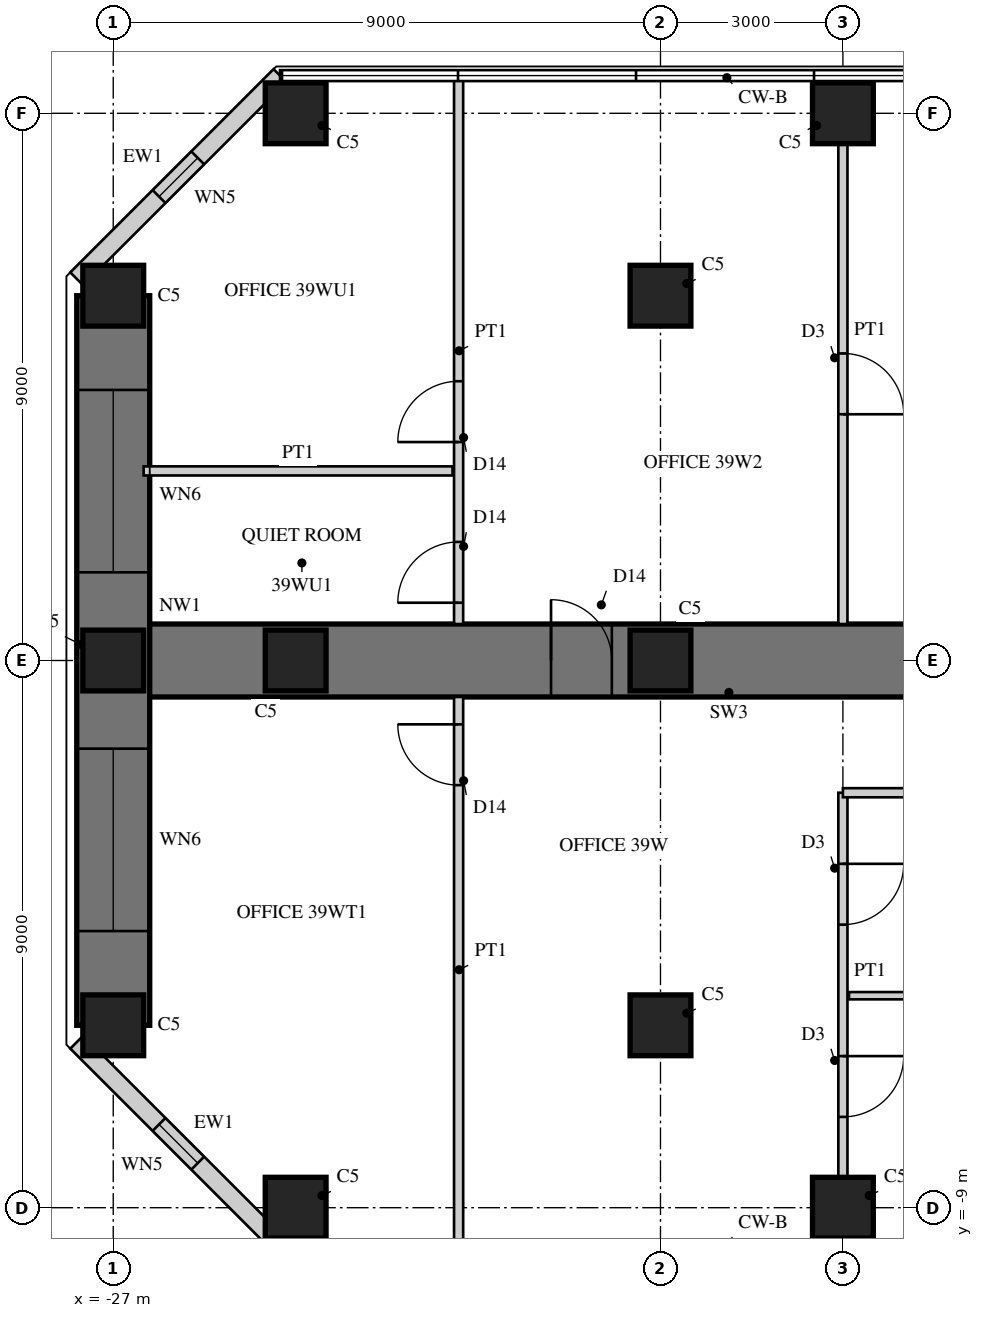
"""IFC4 building model, lengths in metres.
Left out: names, types, materials, properties, quantities, classifications, styles, units other than length and angle.
Written with IfcOpenShell. Run it as: python <this file> out.ifc"""

import sys

from ifc_helpers import new_model, si_unit, direction, frame, frame_2d, origin, origin_2d, place, context, subcontext, project, spatial, rectangle, hollow_rectangle, extrude, element, fill, save


model = new_model("IFC4")
c1 = context("Model", 3, precision=1e-05, world=origin(), true_north=direction((0.0, 1.0)))
c2 = subcontext(c1, "Body", "Model", "MODEL_VIEW")
j1 = project(units=[si_unit("LENGTHUNIT", "METRE"), si_unit("PLANEANGLEUNIT", "RADIAN")], contexts=[c1])
p1 = place(None, origin())
s1 = spatial("IfcSite", under=j1, at=p1, CompositionType="ELEMENT")
p2 = place(p1, origin())
s2 = spatial("IfcBuilding", under=s1, at=p2, CompositionType="ELEMENT")
p3 = place(p2, frame((0.0, 0.0, 160.5)))
s3 = spatial("IfcBuildingStorey", under=s2, at=p3, CompositionType="ELEMENT", Elevation=160.5)
p4 = place(p3, frame((-9.0, 0.0, 0.0), z_axis=(0.0, 0.0, 1.0), x_axis=(-1.0, 0.0, 0.0)))
e1 = element("IfcWall", 1, at=p4, inside=s3, PredefinedType="SHEAR", context=c2, shape_type="SweptSolid", body=[
    extrude(rectangle(XDim=18.0, YDim=1.2, at=frame_2d((9.0, 0.0))), origin(), (0.0, 0.0, 1.0), 4.0),
])
p5 = place(p4, frame((9.8, 0.0, 0.0)))
e2 = element("IfcOpeningElement", 2, at=p5, cuts=e1, PredefinedType="OPENING", context=c2, shape_type="SweptSolid", body=[
    extrude(rectangle(XDim=1.0, YDim=2.2, at=frame_2d((0.5, 1.1))), frame((0.0, 0.61, 0.0), z_axis=(0.0, -1.0, 0.0), x_axis=(1.0, 0.0, 0.0)), (0.0, 0.0, 1.0), 1.22),
])
p6 = place(p3, frame((-27.0, 6.0, 0.0), z_axis=(0.0, 0.0, 1.0), x_axis=(0.0, -1.0, 0.0)))
e3 = element("IfcWall", 3, at=p6, inside=s3, PredefinedType="SHEAR", context=c2, shape_type="SweptSolid", body=[
    extrude(rectangle(XDim=12.0, YDim=1.2, at=frame_2d((6.0, 0.0))), origin(), (0.0, 0.0, 1.0), 4.0),
])
p7 = place(p6, frame((1.55, 0.0, 0.6)))
e4 = element("IfcOpeningElement", 4, at=p7, cuts=e3, PredefinedType="OPENING", context=c2, shape_type="SweptSolid", body=[
    extrude(rectangle(XDim=3.0, YDim=2.4, at=frame_2d((1.5, 1.2))), frame((0.0, 0.61, 0.0), z_axis=(0.0, -1.0, 0.0), x_axis=(1.0, 0.0, 0.0)), (0.0, 0.0, 1.0), 1.22),
])
p8 = place(p6, frame((7.45, 0.0, 0.6)))
e5 = element("IfcOpeningElement", 5, at=p8, cuts=e3, PredefinedType="OPENING", context=c2, shape_type="SweptSolid", body=[
    extrude(rectangle(XDim=3.0, YDim=2.4, at=frame_2d((1.5, 1.2))), frame((0.0, 0.61, 0.0), z_axis=(0.0, -1.0, 0.0), x_axis=(1.0, 0.0, 0.0)), (0.0, 0.0, 1.0), 1.22),
])
for number, where, z_axis, x_axis in (
    (6, (-15.0, 9.0, 0.0), (0.0, 0.0, 1.0), (1.0, 0.0, 0.0)),
    (7, (-24.0, 9.0, 0.0), (0.0, 0.0, 1.0), (1.0, 0.0, 0.0)),
    (8, (-15.0, -9.0, 0.0), (0.0, 0.0, 1.0), (1.0, 0.0, 0.0)),
    (9, (-24.0, -9.0, 0.0), (0.0, 0.0, 1.0), (1.0, 0.0, 0.0)),
    (10, (-27.0, 6.0, 0.0), (0.0, 0.0, 1.0), (1.0, 0.0, 0.0)),
    (11, (-27.0, 0.0, 0.0), (0.0, 0.0, 1.0), (1.0, 0.0, 0.0)),
    (12, (-27.0, -6.0, 0.0), (0.0, 0.0, 1.0), (1.0, 0.0, 0.0)),
    (13, (-18.0, 6.0, 0.0), (0.0, 0.0, 1.0), (1.0, 0.0, 0.0)),
    (14, (-18.0, 0.0, 0.0), (0.0, 0.0, 1.0), (1.0, 0.0, 0.0)),
    (15, (-18.0, -6.0, 0.0), (0.0, 0.0, 1.0), (1.0, 0.0, 0.0)),
    (16, (-24.0, 0.0, 0.0), (0.0, 0.0, 1.0), (1.0, 0.0, 0.0)),
):
    element("IfcColumn", number, at=place(p3, frame(where, z_axis=z_axis, x_axis=x_axis)), inside=s3, PredefinedType="COLUMN", context=c2, shape_type="SweptSolid", body=[
        extrude(rectangle(XDim=1.0, YDim=1.0, at=origin_2d()), origin(), (0.0, 0.0, 1.0), 4.0),
    ])
p9 = place(p3, frame((-24.257, 9.62, 0.0), z_axis=(0.0, 0.0, 1.0), x_axis=(-0.707106781187, -0.707106781187, 0.0)))
e17 = element("IfcWall", 17, at=p9, inside=s3, PredefinedType="SOLIDWALL", context=c2, shape_type="SweptSolid", body=[
    extrude(rectangle(XDim=4.728, YDim=0.3, at=frame_2d((2.364, 0.0))), origin(), (0.0, 0.0, 1.0), 3.75),
])
p10 = place(p9, frame((1.914, 0.0, 0.3)))
e18 = element("IfcOpeningElement", 18, at=p10, cuts=e17, PredefinedType="OPENING", context=c2, shape_type="SweptSolid", body=[
    extrude(rectangle(XDim=0.9, YDim=2.4, at=frame_2d((0.45, 1.2))), frame((0.0, 0.16, 0.0), z_axis=(0.0, -1.0, 0.0), x_axis=(1.0, 0.0, 0.0)), (0.0, 0.0, 1.0), 0.32),
])
p11 = place(p3, frame((-27.6, -6.277, 0.0), z_axis=(0.0, 0.0, 1.0), x_axis=(0.707106781187, -0.707106781187, 0.0)))
e19 = element("IfcWall", 19, at=p11, inside=s3, PredefinedType="SOLIDWALL", context=c2, shape_type="SweptSolid", body=[
    extrude(rectangle(XDim=4.728, YDim=0.3, at=frame_2d((2.364, 0.0))), origin(), (0.0, 0.0, 1.0), 3.75),
])
p12 = place(p11, frame((1.914, 0.0, 0.3)))
e20 = element("IfcOpeningElement", 20, at=p12, cuts=e19, PredefinedType="OPENING", context=c2, shape_type="SweptSolid", body=[
    extrude(rectangle(XDim=0.9, YDim=2.4, at=frame_2d((0.45, 1.2))), frame((0.0, 0.16, 0.0), z_axis=(0.0, -1.0, 0.0), x_axis=(1.0, 0.0, 0.0)), (0.0, 0.0, 1.0), 0.32),
])
p13 = place(p3, frame((-15.0, -2.175, 0.0), z_axis=(0.0, 0.0, 1.0), x_axis=(0.0, -1.0, 0.0)))
e21 = element("IfcWall", 21, at=p13, inside=s3, PredefinedType="PARTITIONING", context=c2, shape_type="SweptSolid", body=[
    extrude(rectangle(XDim=6.325, YDim=0.15, at=frame_2d((3.163, 0.0))), origin(), (0.0, 0.0, 1.0), 2.7),
])
p14 = place(p13, frame((1.169, 0.0, 0.0)))
e22 = element("IfcOpeningElement", 22, at=p14, cuts=e21, PredefinedType="OPENING", context=c2, shape_type="SweptSolid", body=[
    extrude(rectangle(XDim=1.0, YDim=2.1, at=frame_2d((0.5, 1.05))), frame((0.0, 0.085, 0.0), z_axis=(0.0, -1.0, 0.0), x_axis=(1.0, 0.0, 0.0)), (0.0, 0.0, 1.0), 0.17),
])
p15 = place(p13, frame((4.332, 0.0, 0.0)))
e23 = element("IfcOpeningElement", 23, at=p15, cuts=e21, PredefinedType="OPENING", context=c2, shape_type="SweptSolid", body=[
    extrude(rectangle(XDim=1.0, YDim=2.1, at=frame_2d((0.5, 1.05))), frame((0.0, 0.085, 0.0), z_axis=(0.0, -1.0, 0.0), x_axis=(1.0, 0.0, 0.0)), (0.0, 0.0, 1.0), 0.17),
])
p16 = place(p3, frame((-9.65, -2.175, 0.0), z_axis=(0.0, 0.0, 1.0), x_axis=(-1.0, 0.0, 0.0)))
e24 = element("IfcWall", 24, at=p16, inside=s3, PredefinedType="PARTITIONING", context=c2, shape_type="SweptSolid", body=[
    extrude(rectangle(XDim=5.35, YDim=0.15, at=frame_2d((2.675, 0.0))), origin(), (0.0, 0.0, 1.0), 3.75),
])
p17 = place(p3, frame((-9.65, -5.513, 0.0), z_axis=(0.0, 0.0, 1.0), x_axis=(-1.0, 0.0, 0.0)))
e25 = element("IfcWall", 25, at=p17, inside=s3, PredefinedType="PLUMBINGWALL", context=c2, shape_type="SweptSolid", body=[
    extrude(rectangle(XDim=5.25, YDim=0.12, at=frame_2d((2.625, 0.0))), origin(), (0.0, 0.0, 1.0), 3.75),
])
p18 = place(p3, frame((-15.0, 8.5, 0.0), z_axis=(0.0, 0.0, 1.0), x_axis=(0.0, -1.0, 0.0)))
e26 = element("IfcWall", 26, at=p18, inside=s3, PredefinedType="PARTITIONING", context=c2, shape_type="SweptSolid", body=[
    extrude(rectangle(XDim=7.9, YDim=0.15, at=frame_2d((3.95, 0.0))), origin(), (0.0, 0.0, 1.0), 2.7),
])
p19 = place(p18, frame((3.45, 0.0, 0.0)))
e27 = element("IfcOpeningElement", 27, at=p19, cuts=e26, PredefinedType="OPENING", context=c2, shape_type="SweptSolid", body=[
    extrude(rectangle(XDim=1.0, YDim=2.1, at=frame_2d((0.5, 1.05))), frame((0.0, 0.085, 0.0), z_axis=(0.0, -1.0, 0.0), x_axis=(1.0, 0.0, 0.0)), (0.0, 0.0, 1.0), 0.17),
])
p20 = place(p3, frame((-21.32, -0.6, 0.0), z_axis=(0.0, 0.0, 1.0), x_axis=(0.0, -1.0, 0.0)))
e28 = element("IfcWall", 28, at=p20, inside=s3, PredefinedType="PARTITIONING", context=c2, shape_type="SweptSolid", body=[
    extrude(rectangle(XDim=8.98, YDim=0.15, at=frame_2d((4.49, 0.0))), origin(), (0.0, 0.0, 1.0), 3.75),
])
p21 = place(p20, frame((0.45, 0.0, 0.0)))
e29 = element("IfcOpeningElement", 29, at=p21, cuts=e28, PredefinedType="OPENING", context=c2, shape_type="SweptSolid", body=[
    extrude(rectangle(XDim=1.0, YDim=2.2, at=frame_2d((0.5, 1.1))), frame((0.0, 0.085, 0.0), z_axis=(0.0, -1.0, 0.0), x_axis=(1.0, 0.0, 0.0)), (0.0, 0.0, 1.0), 0.17),
])
p22 = place(p3, frame((-21.42, 3.118, 0.0), z_axis=(0.0, 0.0, 1.0), x_axis=(-1.0, 0.0, 0.0)))
e30 = element("IfcWall", 30, at=p22, inside=s3, PredefinedType="PARTITIONING", context=c2, shape_type="SweptSolid", body=[
    extrude(rectangle(XDim=5.08, YDim=0.15, at=frame_2d((2.54, 0.0))), origin(), (0.0, 0.0, 1.0), 3.75),
])
p23 = place(p3, frame((-21.32, 9.58, 0.0), z_axis=(0.0, 0.0, 1.0), x_axis=(0.0, -1.0, 0.0)))
e31 = element("IfcWall", 31, at=p23, inside=s3, PredefinedType="PARTITIONING", context=c2, shape_type="SweptSolid", body=[
    extrude(rectangle(XDim=8.98, YDim=0.15, at=frame_2d((4.49, 0.0))), origin(), (0.0, 0.0, 1.0), 3.75),
])
p24 = place(p23, frame((4.987, 0.0, 0.0)))
e32 = element("IfcOpeningElement", 32, at=p24, cuts=e31, PredefinedType="OPENING", context=c2, shape_type="SweptSolid", body=[
    extrude(rectangle(XDim=1.0, YDim=2.2, at=frame_2d((0.5, 1.1))), frame((0.0, 0.085, 0.0), z_axis=(0.0, -1.0, 0.0), x_axis=(1.0, 0.0, 0.0)), (0.0, 0.0, 1.0), 0.17),
])
p25 = place(p23, frame((7.63, 0.0, 0.0)))
e33 = element("IfcOpeningElement", 33, at=p25, cuts=e31, PredefinedType="OPENING", context=c2, shape_type="SweptSolid", body=[
    extrude(rectangle(XDim=1.0, YDim=2.2, at=frame_2d((0.5, 1.1))), frame((0.0, 0.085, 0.0), z_axis=(0.0, -1.0, 0.0), x_axis=(1.0, 0.0, 0.0)), (0.0, 0.0, 1.0), 0.17),
])
p26 = place(p10, origin())
e34 = element("IfcWindow", 34, at=p26, inside=s3, PartitioningType="SINGLE_PANEL", PredefinedType="WINDOW", context=c2, shape_type="SweptSolid", body=[
    extrude(hollow_rectangle(XDim=0.9, YDim=2.4, WallThickness=0.06, at=frame_2d((0.45, 1.2))), frame((0.0, 0.03, 0.0), z_axis=(0.0, -1.0, 0.0), x_axis=(1.0, 0.0, 0.0)), (0.0, 0.0, 1.0), 0.06),
    extrude(rectangle(XDim=0.779, YDim=2.279, at=frame_2d((0.45, 1.2))), frame((0.0, 0.03, 0.0), z_axis=(0.0, -1.0, 0.0), x_axis=(1.0, 0.0, 0.0)), (0.0, 0.0, 1.0), 0.06),
])
fill(e18, e34)
p27 = place(p7, origin())
e35 = element("IfcWindow", 35, at=p27, inside=s3, PartitioningType="SINGLE_PANEL", PredefinedType="WINDOW", context=c2, shape_type="SweptSolid", body=[
    extrude(hollow_rectangle(XDim=3.0, YDim=2.4, WallThickness=0.06, at=frame_2d((1.5, 1.2))), frame((0.0, 0.03, 0.0), z_axis=(0.0, -1.0, 0.0), x_axis=(1.0, 0.0, 0.0)), (0.0, 0.0, 1.0), 0.06),
    extrude(rectangle(XDim=2.879, YDim=2.279, at=frame_2d((1.5, 1.2))), frame((0.0, 0.03, 0.0), z_axis=(0.0, -1.0, 0.0), x_axis=(1.0, 0.0, 0.0)), (0.0, 0.0, 1.0), 0.06),
])
fill(e4, e35)
p28 = place(p8, origin())
e36 = element("IfcWindow", 36, at=p28, inside=s3, PartitioningType="SINGLE_PANEL", PredefinedType="WINDOW", context=c2, shape_type="SweptSolid", body=[
    extrude(hollow_rectangle(XDim=3.0, YDim=2.4, WallThickness=0.06, at=frame_2d((1.5, 1.2))), frame((0.0, 0.03, 0.0), z_axis=(0.0, -1.0, 0.0), x_axis=(1.0, 0.0, 0.0)), (0.0, 0.0, 1.0), 0.06),
    extrude(rectangle(XDim=2.879, YDim=2.279, at=frame_2d((1.5, 1.2))), frame((0.0, 0.03, 0.0), z_axis=(0.0, -1.0, 0.0), x_axis=(1.0, 0.0, 0.0)), (0.0, 0.0, 1.0), 0.06),
])
fill(e5, e36)
p29 = place(p12, origin())
e37 = element("IfcWindow", 37, at=p29, inside=s3, PartitioningType="SINGLE_PANEL", PredefinedType="WINDOW", context=c2, shape_type="SweptSolid", body=[
    extrude(hollow_rectangle(XDim=0.9, YDim=2.4, WallThickness=0.06, at=frame_2d((0.45, 1.2))), frame((0.0, 0.03, 0.0), z_axis=(0.0, -1.0, 0.0), x_axis=(1.0, 0.0, 0.0)), (0.0, 0.0, 1.0), 0.06),
    extrude(rectangle(XDim=0.779, YDim=2.279, at=frame_2d((0.45, 1.2))), frame((0.0, 0.03, 0.0), z_axis=(0.0, -1.0, 0.0), x_axis=(1.0, 0.0, 0.0)), (0.0, 0.0, 1.0), 0.06),
])
fill(e20, e37)
p30 = place(p14, origin())
e38 = element("IfcDoor", 38, at=p30, inside=s3, OperationType="SINGLE_SWING_LEFT", PredefinedType="DOOR", context=c2, shape_type="SweptSolid", body=[
    extrude(rectangle(XDim=1.0, YDim=2.1, at=frame_2d((0.5, 1.05))), frame((0.0, 0.025, 0.0), z_axis=(0.0, -1.0, 0.0), x_axis=(1.0, 0.0, 0.0)), (0.0, 0.0, 1.0), 0.05),
])
fill(e22, e38)
p31 = place(p15, origin())
e39 = element("IfcDoor", 39, at=p31, inside=s3, OperationType="SINGLE_SWING_LEFT", PredefinedType="DOOR", context=c2, shape_type="SweptSolid", body=[
    extrude(rectangle(XDim=1.0, YDim=2.1, at=frame_2d((0.5, 1.05))), frame((0.0, 0.025, 0.0), z_axis=(0.0, -1.0, 0.0), x_axis=(1.0, 0.0, 0.0)), (0.0, 0.0, 1.0), 0.05),
])
fill(e23, e39)
p32 = place(p19, origin())
e40 = element("IfcDoor", 40, at=p32, inside=s3, OperationType="SINGLE_SWING_RIGHT", PredefinedType="DOOR", context=c2, shape_type="SweptSolid", body=[
    extrude(rectangle(XDim=1.0, YDim=2.1, at=frame_2d((0.5, 1.05))), frame((0.0, 0.025, 0.0), z_axis=(0.0, -1.0, 0.0), x_axis=(1.0, 0.0, 0.0)), (0.0, 0.0, 1.0), 0.05),
])
fill(e27, e40)
p33 = place(p21, frame((1.0, 0.0, 0.0), z_axis=(0.0, 0.0, 1.0), x_axis=(-1.0, 0.0, 0.0)))
e41 = element("IfcDoor", 41, at=p33, inside=s3, OperationType="SINGLE_SWING_RIGHT", PredefinedType="DOOR", context=c2, shape_type="SweptSolid", body=[
    extrude(rectangle(XDim=1.0, YDim=2.2, at=frame_2d((0.5, 1.1))), frame((0.0, 0.025, 0.0), z_axis=(0.0, -1.0, 0.0), x_axis=(1.0, 0.0, 0.0)), (0.0, 0.0, 1.0), 0.05),
])
fill(e29, e41)
p34 = place(p24, frame((1.0, 0.0, 0.0), z_axis=(0.0, 0.0, 1.0), x_axis=(-1.0, 0.0, 0.0)))
e42 = element("IfcDoor", 42, at=p34, inside=s3, OperationType="SINGLE_SWING_LEFT", PredefinedType="DOOR", context=c2, shape_type="SweptSolid", body=[
    extrude(rectangle(XDim=1.0, YDim=2.2, at=frame_2d((0.5, 1.1))), frame((0.0, 0.025, 0.0), z_axis=(0.0, -1.0, 0.0), x_axis=(1.0, 0.0, 0.0)), (0.0, 0.0, 1.0), 0.05),
])
fill(e32, e42)
p35 = place(p25, frame((1.0, 0.0, 0.0), z_axis=(0.0, 0.0, 1.0), x_axis=(-1.0, 0.0, 0.0)))
e43 = element("IfcDoor", 43, at=p35, inside=s3, OperationType="SINGLE_SWING_LEFT", PredefinedType="DOOR", context=c2, shape_type="SweptSolid", body=[
    extrude(rectangle(XDim=1.0, YDim=2.2, at=frame_2d((0.5, 1.1))), frame((0.0, 0.025, 0.0), z_axis=(0.0, -1.0, 0.0), x_axis=(1.0, 0.0, 0.0)), (0.0, 0.0, 1.0), 0.05),
])
fill(e33, e43)
p36 = place(p5, frame((1.0, 0.0, 0.0), z_axis=(0.0, 0.0, 1.0), x_axis=(-1.0, 0.0, 0.0)))
e44 = element("IfcDoor", 44, at=p36, inside=s3, OperationType="SINGLE_SWING_LEFT", PredefinedType="DOOR", context=c2, shape_type="SweptSolid", body=[
    extrude(rectangle(XDim=1.0, YDim=2.2, at=frame_2d((0.5, 1.1))), frame((0.0, 0.025, 0.0), z_axis=(0.0, -1.0, 0.0), x_axis=(1.0, 0.0, 0.0)), (0.0, 0.0, 1.0), 0.05),
])
fill(e2, e44)
save(model, sys.argv[1])
